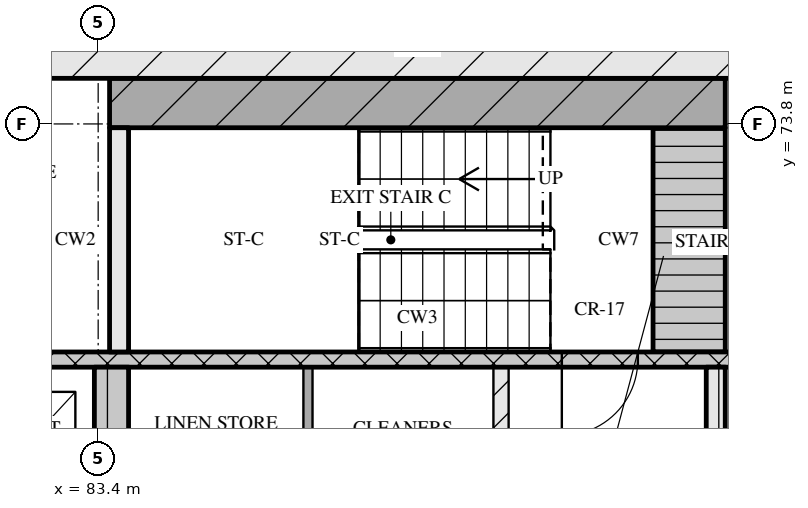
"""IFC4 building model, lengths in metres.
Left out: names, types, materials, properties, quantities, classifications, styles, units other than length and angle.
Written with IfcOpenShell. Run it as: python <this file> out.ifc"""

import sys

from ifc_helpers import new_model, si_unit, direction, frame, frame_2d, origin, place, context, subcontext, project, spatial, rectangle, extrude, element, fill, save


model = new_model("IFC4")
c1 = context("Model", 3, precision=1e-05, world=origin(), true_north=direction((0.0, 1.0)))
c2 = subcontext(c1, "Body", "Model", "MODEL_VIEW")
j1 = project(units=[si_unit("LENGTHUNIT", "METRE"), si_unit("PLANEANGLEUNIT", "RADIAN")], contexts=[c1])
p1 = place(None, origin())
s1 = spatial("IfcSite", under=j1, at=p1, CompositionType="ELEMENT")
p2 = place(p1, origin())
s2 = spatial("IfcBuilding", under=s1, at=p2, CompositionType="ELEMENT")
p3 = place(p2, frame((0.0, 0.0, 58.8)))
s3 = spatial("IfcBuildingStorey", under=s2, at=p3, CompositionType="ELEMENT", Elevation=58.8)
p4 = place(p3, frame((66.6, 75.0, 0.0), z_axis=(0.0, 0.0, 1.0), x_axis=(1.0, 0.0, 0.0)))
e1 = element("IfcWall", 1, at=p4, inside=s3, PredefinedType="SOLIDWALL", context=c2, shape_type="SweptSolid", body=[
    extrude(rectangle(XDim=42.0, YDim=1.2, at=frame_2d((21.0, 0.0))), origin(), (0.0, 0.0, 1.0), 3.32),
])
p5 = place(p3, frame((83.575, 68.0, 0.0), z_axis=(0.0, 0.0, 1.0), x_axis=(0.0, 1.0, 0.0)))
e2 = element("IfcWall", 2, at=p5, inside=s3, PredefinedType="SOLIDWALL", context=c2, shape_type="SweptSolid", body=[
    extrude(rectangle(XDim=2.6, YDim=0.45, at=frame_2d((1.3, 0.0))), origin(), (0.0, 0.0, 1.0), 3.32),
])
p6 = place(p3, frame((86.16, 68.0, 0.0), z_axis=(0.0, 0.0, 1.0), x_axis=(0.0, 1.0, 0.0)))
e3 = element("IfcWall", 3, at=p6, inside=s3, PredefinedType="PARTITIONING", context=c2, shape_type="SweptSolid", body=[
    extrude(rectangle(XDim=2.6, YDim=0.12, at=frame_2d((1.3, 0.0))), origin(), (0.0, 0.0, 1.0), 3.32),
])
p7 = place(p3, frame((88.7, 68.0, 0.0), z_axis=(0.0, 0.0, 1.0), x_axis=(0.0, 1.0, 0.0)))
e4 = element("IfcWall", 4, at=p7, inside=s3, PredefinedType="PARTITIONING", context=c2, shape_type="SweptSolid", body=[
    extrude(rectangle(XDim=2.6, YDim=0.2, at=frame_2d((1.3, 0.0))), origin(), (0.0, 0.0, 1.0), 3.32),
])
p8 = place(p3, frame((91.525, 68.0, 0.0), z_axis=(0.0, 0.0, 1.0), x_axis=(0.0, 1.0, 0.0)))
e5 = element("IfcWall", 5, at=p8, inside=s3, PredefinedType="SOLIDWALL", context=c2, shape_type="SweptSolid", body=[
    extrude(rectangle(XDim=2.6, YDim=0.25, at=frame_2d((1.3, 0.0))), origin(), (0.0, 0.0, 1.0), 3.32),
])
p9 = place(p3, frame((67.8, 70.7, 0.0), z_axis=(0.0, 0.0, 1.0), x_axis=(1.0, 0.0, 0.0)))
e6 = element("IfcWall", 6, at=p9, inside=s3, PredefinedType="SOLIDWALL", context=c2, shape_type="SweptSolid", body=[
    extrude(rectangle(XDim=39.6, YDim=0.2, at=frame_2d((19.8, 0.0))), origin(), (0.0, 0.0, 1.0), 3.32),
])
p10 = place(p9, frame((0.65, 0.0, 0.0)))
e7 = element("IfcOpeningElement", 7, at=p10, cuts=e6, PredefinedType="OPENING", context=c2, shape_type="SweptSolid", body=[
    extrude(rectangle(XDim=1.1, YDim=2.1, at=frame_2d((0.55, 1.05))), frame((0.0, 0.11, 0.0), z_axis=(0.0, -1.0, 0.0), x_axis=(1.0, 0.0, 0.0)), (0.0, 0.0, 1.0), 0.22),
])
p11 = place(p9, frame((3.25, 0.0, 0.0)))
e8 = element("IfcOpeningElement", 8, at=p11, cuts=e6, PredefinedType="OPENING", context=c2, shape_type="SweptSolid", body=[
    extrude(rectangle(XDim=1.1, YDim=2.1, at=frame_2d((0.55, 1.05))), frame((0.0, 0.11, 0.0), z_axis=(0.0, -1.0, 0.0), x_axis=(1.0, 0.0, 0.0)), (0.0, 0.0, 1.0), 0.22),
])
p12 = place(p9, frame((5.9, 0.0, 0.0)))
e9 = element("IfcOpeningElement", 9, at=p12, cuts=e6, PredefinedType="OPENING", context=c2, shape_type="SweptSolid", body=[
    extrude(rectangle(XDim=1.0, YDim=2.1, at=frame_2d((0.5, 1.05))), frame((0.0, 0.11, 0.0), z_axis=(0.0, -1.0, 0.0), x_axis=(1.0, 0.0, 0.0)), (0.0, 0.0, 1.0), 0.22),
])
p13 = place(p9, frame((21.7, 0.0, 0.0)))
e10 = element("IfcOpeningElement", 10, at=p13, cuts=e6, PredefinedType="OPENING", context=c2, shape_type="SweptSolid", body=[
    extrude(rectangle(XDim=1.0, YDim=2.1, at=frame_2d((0.5, 1.05))), frame((0.0, 0.11, 0.0), z_axis=(0.0, -1.0, 0.0), x_axis=(1.0, 0.0, 0.0)), (0.0, 0.0, 1.0), 0.22),
])
p14 = place(p9, frame((32.7, 0.0, 0.0)))
e11 = element("IfcOpeningElement", 11, at=p14, cuts=e6, PredefinedType="OPENING", context=c2, shape_type="SweptSolid", body=[
    extrude(rectangle(XDim=1.0, YDim=2.1, at=frame_2d((0.5, 1.05))), frame((0.0, 0.11, 0.0), z_axis=(0.0, -1.0, 0.0), x_axis=(1.0, 0.0, 0.0)), (0.0, 0.0, 1.0), 0.22),
])
p15 = place(p9, frame((35.25, 0.0, 0.0)))
e12 = element("IfcOpeningElement", 12, at=p15, cuts=e6, PredefinedType="OPENING", context=c2, shape_type="SweptSolid", body=[
    extrude(rectangle(XDim=1.1, YDim=2.1, at=frame_2d((0.55, 1.05))), frame((0.0, 0.11, 0.0), z_axis=(0.0, -1.0, 0.0), x_axis=(1.0, 0.0, 0.0)), (0.0, 0.0, 1.0), 0.22),
])
p16 = place(p9, frame((37.85, 0.0, 0.0)))
e13 = element("IfcOpeningElement", 13, at=p16, cuts=e6, PredefinedType="OPENING", context=c2, shape_type="SweptSolid", body=[
    extrude(rectangle(XDim=1.1, YDim=2.1, at=frame_2d((0.55, 1.05))), frame((0.0, 0.11, 0.0), z_axis=(0.0, -1.0, 0.0), x_axis=(1.0, 0.0, 0.0)), (0.0, 0.0, 1.0), 0.22),
])
p17 = place(p3, frame((83.675, 70.8, 0.0), z_axis=(0.0, 0.0, 1.0), x_axis=(0.0, 1.0, 0.0)))
e14 = element("IfcWall", 14, at=p17, inside=s3, PredefinedType="SOLIDWALL", context=c2, shape_type="SweptSolid", body=[
    extrude(rectangle(XDim=2.95, YDim=0.25, at=frame_2d((1.475, 0.0))), origin(), (0.0, 0.0, 1.0), 3.32),
])
p18 = place(p3, frame((91.175, 70.8, 0.0), z_axis=(0.0, 0.0, 1.0), x_axis=(0.0, 1.0, 0.0)))
e15 = element("IfcWall", 15, at=p18, inside=s3, PredefinedType="SOLIDWALL", context=c2, shape_type="SweptSolid", body=[
    extrude(rectangle(XDim=2.95, YDim=0.95, at=frame_2d((1.475, 0.0))), origin(), (0.0, 0.0, 1.0), 3.32),
])
p19 = place(p3, frame((83.55, 74.075, 0.0), z_axis=(0.0, 0.0, 1.0), x_axis=(1.0, 0.0, 0.0)))
e16 = element("IfcWall", 16, at=p19, inside=s3, PredefinedType="SOLIDWALL", context=c2, shape_type="SweptSolid", body=[
    extrude(rectangle(XDim=8.1, YDim=0.65, at=frame_2d((4.05, 0.0))), origin(), (0.0, 0.0, 1.0), 3.32),
])
p20 = place(p13, origin())
e17 = element("IfcDoor", 17, at=p20, inside=s3, OperationType="SINGLE_SWING_RIGHT", PredefinedType="DOOR", context=c2, shape_type="SweptSolid", body=[
    extrude(rectangle(XDim=1.0, YDim=2.1, at=frame_2d((0.5, 1.05))), frame((0.0, 0.025, 0.0), z_axis=(0.0, -1.0, 0.0), x_axis=(1.0, 0.0, 0.0)), (0.0, 0.0, 1.0), 0.05),
])
fill(e10, e17)
save(model, sys.argv[1])
